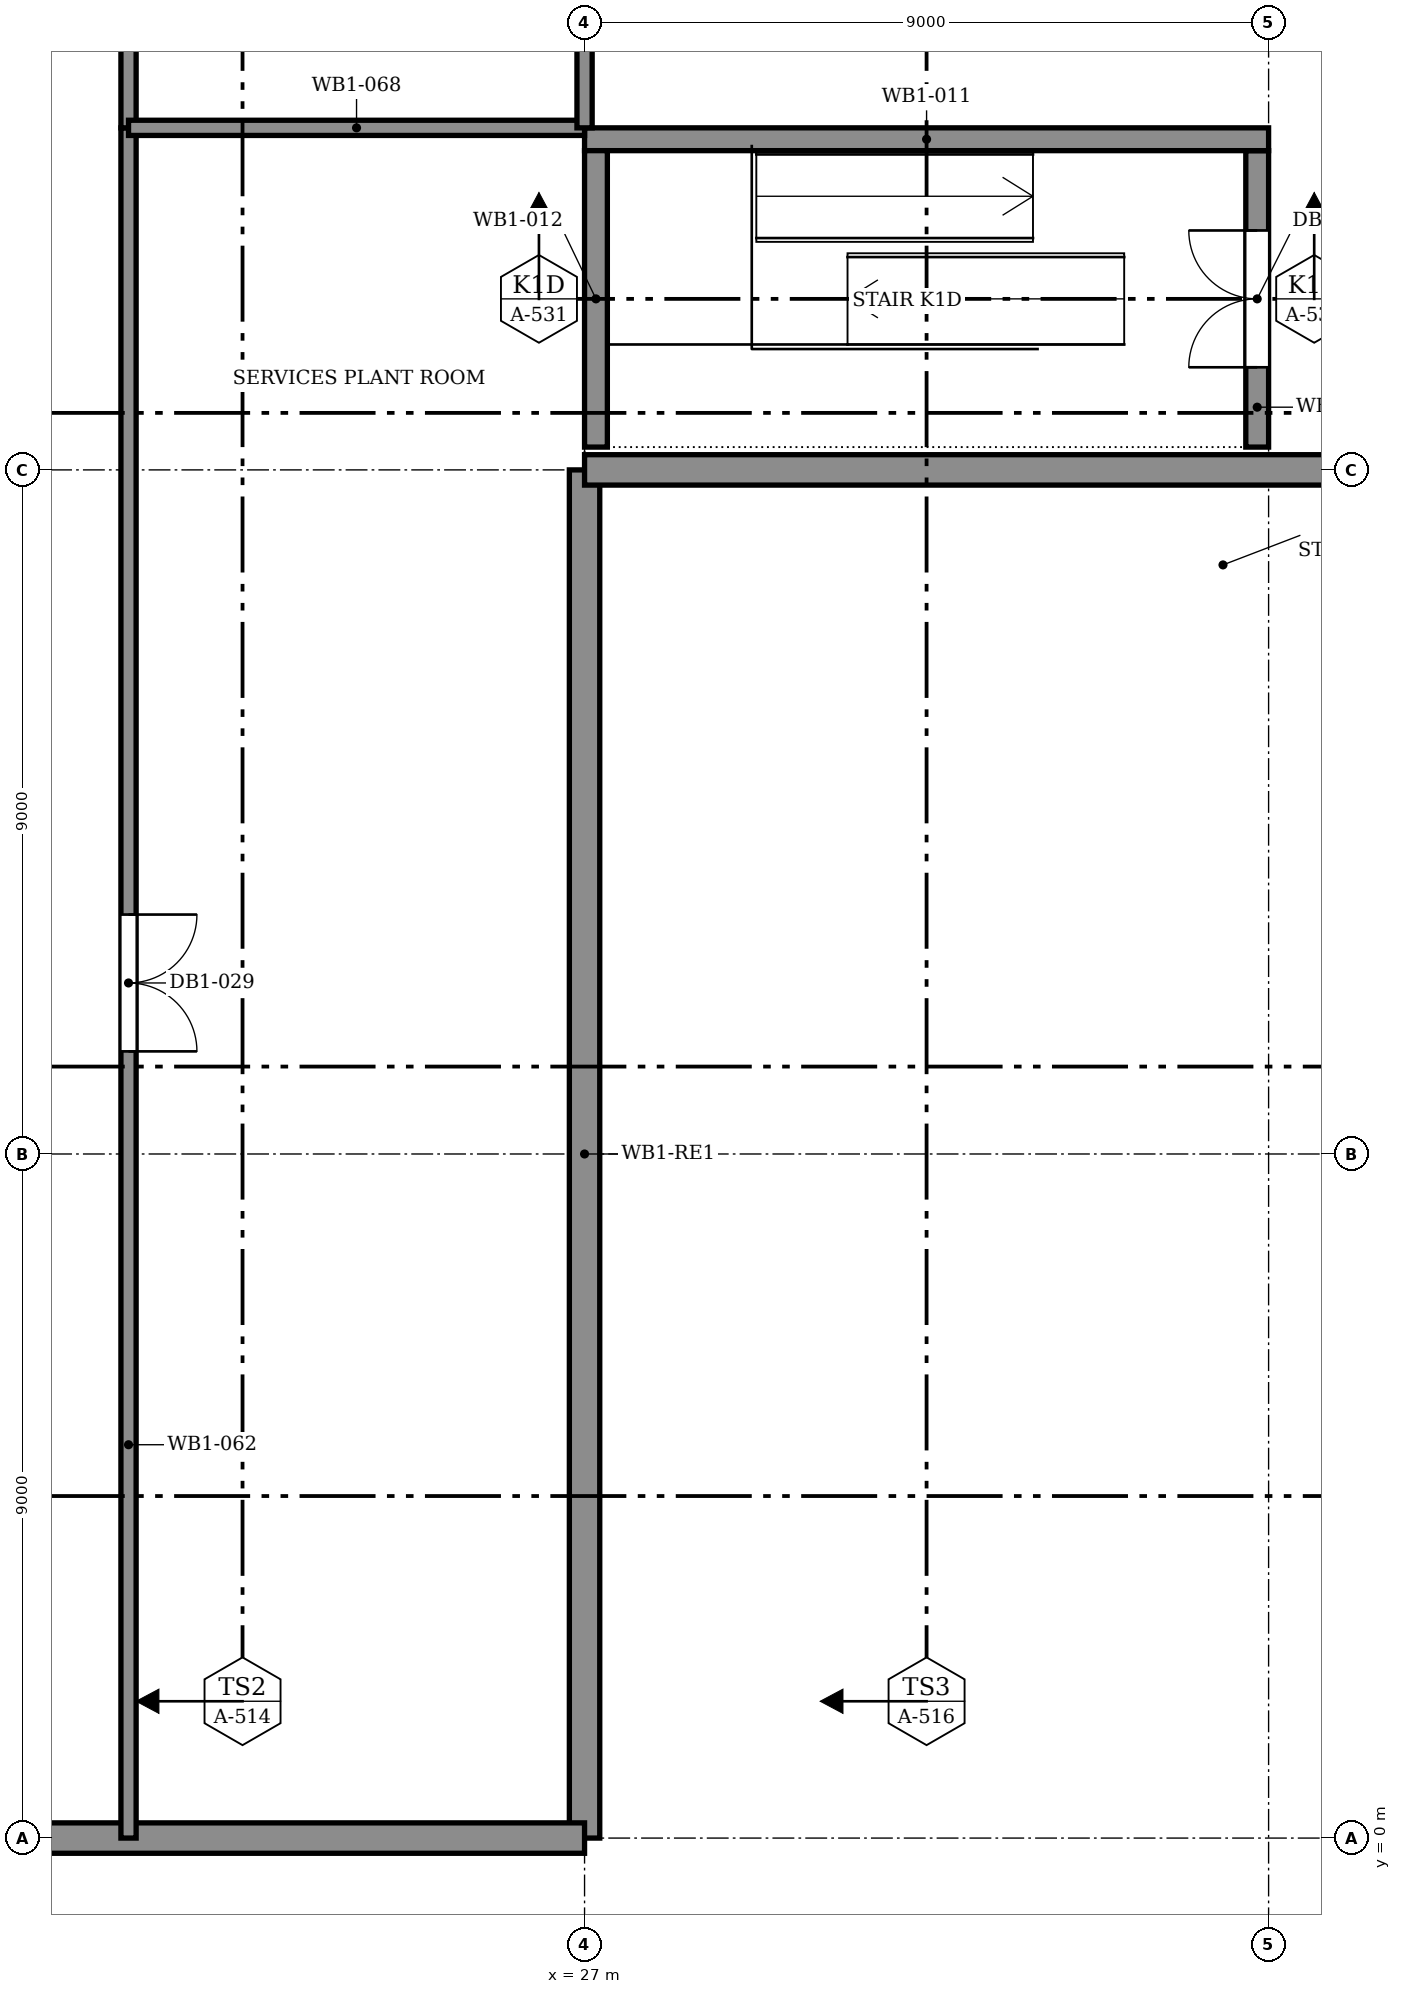
"""IFC4 building model, lengths in metres.
Left out: names, types, materials, properties, quantities, classifications, styles, units other than length and angle.
Written with IfcOpenShell. Run it as: python <this file> out.ifc"""

import sys

from ifc_helpers import new_model, si_unit, direction, frame, frame_2d, origin, origin_with_axes, place, context, subcontext, project, spatial, rectangle, extrude, element, fill, save


model = new_model("IFC4")
c1 = context("Model", 3, precision=1e-05, world=origin(), true_north=direction((0.0, 1.0)))
c2 = subcontext(c1, "Body", "Model", "MODEL_VIEW")
j1 = project(units=[si_unit("LENGTHUNIT", "METRE"), si_unit("PLANEANGLEUNIT", "RADIAN")], contexts=[c1])
p1 = place(None, origin())
s1 = spatial("IfcSite", under=j1, at=p1, CompositionType="ELEMENT")
p2 = place(p1, origin())
s2 = spatial("IfcBuilding", under=s1, at=p2, CompositionType="ELEMENT")
p3 = place(p2, frame((0.0, 0.0, -4.8)))
s3 = spatial("IfcBuildingStorey", under=s2, at=p3, CompositionType="ELEMENT", Elevation=-4.8)
p4 = place(p3, frame((27.0, 0.0, 0.0), z_axis=(0.0, 0.0, 1.0), x_axis=(0.0, 1.0, 0.0)))
e1 = element("IfcWall", 1, at=p4, inside=s3, PredefinedType="SOLIDWALL", context=c2, shape_type="SweptSolid", body=[
    extrude(rectangle(XDim=18.0, YDim=0.4, at=frame_2d((9.0, 0.0))), origin(), (0.0, 0.0, 1.0), 4.8),
])
p5 = place(p3, origin_with_axes())
e2 = element("IfcWall", 2, at=p5, inside=s3, PredefinedType="SOLIDWALL", context=c2, shape_type="SweptSolid", body=[
    extrude(rectangle(XDim=27.0, YDim=0.4, at=frame_2d((13.5, 0.0))), origin(), (0.0, 0.0, 1.0), 4.8),
])
p6 = place(p3, frame((27.0, 18.0, 0.0), z_axis=(0.0, 0.0, 1.0), x_axis=(1.0, 0.0, 0.0)))
e3 = element("IfcWall", 3, at=p6, inside=s3, PredefinedType="SOLIDWALL", context=c2, shape_type="SweptSolid", body=[
    extrude(rectangle(XDim=45.0, YDim=0.4, at=frame_2d((22.5, 0.0))), origin(), (0.0, 0.0, 1.0), 4.8),
])
p7 = place(p3, frame((35.85, 18.3, 0.0), z_axis=(0.0, 0.0, 1.0), x_axis=(0.0, 1.0, 0.0)))
e4 = element("IfcWall", 4, at=p7, inside=s3, PredefinedType="SOLIDWALL", context=c2, shape_type="SweptSolid", body=[
    extrude(rectangle(XDim=3.9, YDim=0.3, at=frame_2d((1.95, 0.0))), origin(), (0.0, 0.0, 1.0), 4.8),
])
p8 = place(p7, frame((1.05, 0.0, 0.0)))
e5 = element("IfcOpeningElement", 5, at=p8, cuts=e4, PredefinedType="OPENING", context=c2, shape_type="SweptSolid", body=[
    extrude(rectangle(XDim=1.8, YDim=2.1, at=frame_2d((0.9, 1.05))), frame((0.0, 0.16, 0.0), z_axis=(0.0, -1.0, 0.0), x_axis=(1.0, 0.0, 0.0)), (0.0, 0.0, 1.0), 0.32),
])
p9 = place(p3, frame((27.0, 22.35, 0.0), z_axis=(0.0, 0.0, 1.0), x_axis=(1.0, 0.0, 0.0)))
e6 = element("IfcWall", 6, at=p9, inside=s3, PredefinedType="SOLIDWALL", context=c2, shape_type="SweptSolid", body=[
    extrude(rectangle(XDim=9.0, YDim=0.3, at=frame_2d((4.5, 0.0))), origin(), (0.0, 0.0, 1.0), 4.8),
])
p10 = place(p3, frame((27.15, 18.3, 0.0), z_axis=(0.0, 0.0, 1.0), x_axis=(0.0, 1.0, 0.0)))
e7 = element("IfcWall", 7, at=p10, inside=s3, PredefinedType="SOLIDWALL", context=c2, shape_type="SweptSolid", body=[
    extrude(rectangle(XDim=3.9, YDim=0.3, at=frame_2d((1.95, 0.0))), origin(), (0.0, 0.0, 1.0), 4.8),
])
p11 = place(p3, frame((21.0, 0.0, 0.0), z_axis=(0.0, 0.0, 1.0), x_axis=(0.0, 1.0, 0.0)))
e8 = element("IfcWall", 8, at=p11, inside=s3, PredefinedType="PARTITIONING", context=c2, shape_type="SweptSolid", body=[
    extrude(rectangle(XDim=22.5, YDim=0.2, at=frame_2d((11.25, 0.0))), origin(), (0.0, 0.0, 1.0), 4.023),
])
p12 = place(p11, frame((10.35, 0.0, 0.0)))
e9 = element("IfcOpeningElement", 9, at=p12, cuts=e8, PredefinedType="OPENING", context=c2, shape_type="SweptSolid", body=[
    extrude(rectangle(XDim=1.8, YDim=2.1, at=frame_2d((0.9, 1.05))), frame((0.0, 0.11, 0.0), z_axis=(0.0, -1.0, 0.0), x_axis=(1.0, 0.0, 0.0)), (0.0, 0.0, 1.0), 0.22),
])
p13 = place(p3, frame((21.0, 22.5, 0.0), z_axis=(0.0, 0.0, 1.0), x_axis=(0.0, 1.0, 0.0)))
e10 = element("IfcWall", 10, at=p13, inside=s3, PredefinedType="PARTITIONING", context=c2, shape_type="SweptSolid", body=[
    extrude(rectangle(XDim=9.0, YDim=0.2, at=frame_2d((4.5, 0.0))), origin(), (0.0, 0.0, 1.0), 4.023),
])
p14 = place(p13, frame((3.61, 0.0, 0.0)))
e11 = element("IfcOpeningElement", 11, at=p14, cuts=e10, PredefinedType="OPENING", context=c2, shape_type="SweptSolid", body=[
    extrude(rectangle(XDim=1.8, YDim=2.1, at=frame_2d((0.9, 1.05))), frame((0.0, 0.11, 0.0), z_axis=(0.0, -1.0, 0.0), x_axis=(1.0, 0.0, 0.0)), (0.0, 0.0, 1.0), 0.22),
])
p15 = place(p3, frame((21.0, 22.5, 0.0), z_axis=(0.0, 0.0, 1.0), x_axis=(1.0, 0.0, 0.0)))
e12 = element("IfcWall", 12, at=p15, inside=s3, PredefinedType="PARTITIONING", context=c2, shape_type="SweptSolid", body=[
    extrude(rectangle(XDim=6.0, YDim=0.2, at=frame_2d((3.0, 0.0))), origin(), (0.0, 0.0, 1.0), 4.023),
])
p16 = place(p3, frame((27.0, 22.5, 0.0), z_axis=(0.0, 0.0, 1.0), x_axis=(0.0, 1.0, 0.0)))
e13 = element("IfcWall", 13, at=p16, inside=s3, PredefinedType="PARTITIONING", context=c2, shape_type="SweptSolid", body=[
    extrude(rectangle(XDim=4.331, YDim=0.2, at=frame_2d((2.165, 0.0))), origin(), (0.0, 0.0, 1.0), 4.023),
])
p17 = place(p8, origin())
e14 = element("IfcDoor", 14, at=p17, inside=s3, OperationType="DOUBLE_DOOR_SINGLE_SWING", PredefinedType="DOOR", context=c2, shape_type="SweptSolid", body=[
    extrude(rectangle(XDim=1.8, YDim=2.1, at=frame_2d((0.9, 1.05))), frame((0.0, 0.025, 0.0), z_axis=(0.0, -1.0, 0.0), x_axis=(1.0, 0.0, 0.0)), (0.0, 0.0, 1.0), 0.05),
])
fill(e5, e14)
p18 = place(p12, frame((1.8, 0.0, 0.0), z_axis=(0.0, 0.0, 1.0), x_axis=(-1.0, 0.0, 0.0)))
e15 = element("IfcDoor", 15, at=p18, inside=s3, OperationType="DOUBLE_DOOR_SINGLE_SWING", PredefinedType="DOOR", context=c2, shape_type="SweptSolid", body=[
    extrude(rectangle(XDim=1.8, YDim=2.1, at=frame_2d((0.9, 1.05))), frame((0.0, 0.025, 0.0), z_axis=(0.0, -1.0, 0.0), x_axis=(1.0, 0.0, 0.0)), (0.0, 0.0, 1.0), 0.05),
])
fill(e9, e15)
save(model, sys.argv[1])
